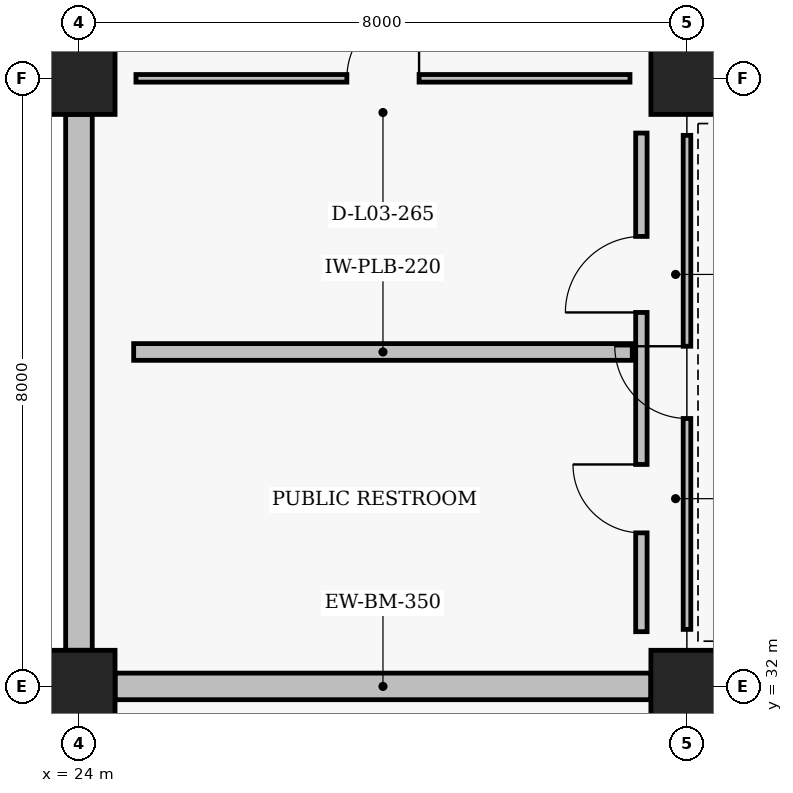
"""IFC4 building model, lengths in metres.
Left out: names, types, materials, properties, quantities, classifications, styles, units other than length and angle.
Written with IfcOpenShell. Run it as: python <this file> out.ifc"""

import sys

from ifc_helpers import new_model, si_unit, direction, frame, frame_2d, origin, origin_2d, place, context, subcontext, project, spatial, rectangle, extrude, element, fill, save


model = new_model("IFC4")
c1 = context("Model", 3, precision=1e-05, world=origin(), true_north=direction((0.0, 1.0)))
c2 = subcontext(c1, "Body", "Model", "MODEL_VIEW")
j1 = project(units=[si_unit("LENGTHUNIT", "METRE"), si_unit("PLANEANGLEUNIT", "RADIAN")], contexts=[c1])
p1 = place(None, origin())
s1 = spatial("IfcSite", under=j1, at=p1, CompositionType="ELEMENT")
p2 = place(p1, origin())
s2 = spatial("IfcBuilding", under=s1, at=p2, CompositionType="ELEMENT")
p3 = place(p2, frame((0.0, 0.0, 9.6)))
s3 = spatial("IfcBuildingStorey", under=s2, at=p3, CompositionType="ELEMENT", Elevation=9.6)
for number, where, z_axis, x_axis in (
    (1, (24.0, 32.0, 0.0), (0.0, 0.0, 1.0), (1.0, 0.0, 0.0)),
    (2, (24.0, 40.0, 0.0), (0.0, 0.0, 1.0), (1.0, 0.0, 0.0)),
    (3, (32.0, 32.0, 0.0), (0.0, 0.0, 1.0), (1.0, 0.0, 0.0)),
    (4, (32.0, 40.0, 0.0), (0.0, 0.0, 1.0), (1.0, 0.0, 0.0)),
):
    element("IfcColumn", number, at=place(p3, frame(where, z_axis=z_axis, x_axis=x_axis)), inside=s3, PredefinedType="COLUMN", context=c2, shape_type="SweptSolid", body=[
        extrude(rectangle(XDim=0.95, YDim=0.95, at=origin_2d()), origin(), (0.0, 0.0, 1.0), 4.8),
    ])
p4 = place(p3, frame((24.475, 32.0, 0.0), z_axis=(0.0, 0.0, 1.0), x_axis=(1.0, 0.0, 0.0)))
e5 = element("IfcWall", 5, at=p4, inside=s3, PredefinedType="SOLIDWALL", context=c2, shape_type="SweptSolid", body=[
    extrude(rectangle(XDim=7.05, YDim=0.35, at=frame_2d((3.525, 0.0))), origin(), (0.0, 0.0, 1.0), 3.93),
])
p5 = place(p3, frame((24.0, 32.475, 0.0), z_axis=(0.0, 0.0, 1.0), x_axis=(0.0, 1.0, 0.0)))
e6 = element("IfcWall", 6, at=p5, inside=s3, PredefinedType="SOLIDWALL", context=c2, shape_type="SweptSolid", body=[
    extrude(rectangle(XDim=7.05, YDim=0.35, at=frame_2d((3.525, 0.0))), origin(), (0.0, 0.0, 1.0), 3.68),
])
p6 = place(p3, frame((24.72, 36.4, 0.0), z_axis=(0.0, 0.0, 1.0), x_axis=(1.0, 0.0, 0.0)))
e7 = element("IfcWall", 7, at=p6, inside=s3, PredefinedType="PLUMBINGWALL", context=c2, shape_type="SweptSolid", body=[
    extrude(rectangle(XDim=6.56, YDim=0.22, at=frame_2d((3.28, 0.0))), origin(), (0.0, 0.0, 1.0), 4.18),
])
p7 = place(p3, frame((31.4, 32.72, 0.0), z_axis=(0.0, 0.0, 1.0), x_axis=(0.0, 1.0, 0.0)))
e8 = element("IfcWall", 8, at=p7, inside=s3, PredefinedType="PARTITIONING", context=c2, shape_type="SweptSolid", body=[
    extrude(rectangle(XDim=6.56, YDim=0.15, at=frame_2d((3.28, 0.0))), origin(), (0.0, 0.0, 1.0), 4.18),
])
p8 = place(p7, frame((1.3, 0.0, 0.0)))
e9 = element("IfcOpeningElement", 9, at=p8, cuts=e8, PredefinedType="OPENING", context=c2, shape_type="SweptSolid", body=[
    extrude(rectangle(XDim=0.9, YDim=2.1, at=frame_2d((0.45, 1.05))), frame((0.0, 0.085, 0.0), z_axis=(0.0, -1.0, 0.0), x_axis=(1.0, 0.0, 0.0)), (0.0, 0.0, 1.0), 0.17),
])
p9 = place(p7, frame((4.2, 0.0, 0.0)))
e10 = element("IfcOpeningElement", 10, at=p9, cuts=e8, PredefinedType="OPENING", context=c2, shape_type="SweptSolid", body=[
    extrude(rectangle(XDim=1.0, YDim=2.15, at=frame_2d((0.5, 1.075))), frame((0.0, 0.085, 0.0), z_axis=(0.0, -1.0, 0.0), x_axis=(1.0, 0.0, 0.0)), (0.0, 0.0, 1.0), 0.17),
])
p10 = place(p3, frame((24.75, 40.0, 0.0), z_axis=(0.0, 0.0, 1.0), x_axis=(1.0, 0.0, 0.0)))
e11 = element("IfcWall", 11, at=p10, inside=s3, PredefinedType="PARTITIONING", context=c2, shape_type="SweptSolid", body=[
    extrude(rectangle(XDim=6.5, YDim=0.1, at=frame_2d((3.25, 0.0))), origin(), (0.0, 0.0, 1.0), 3.68),
])
p11 = place(p10, frame((2.775, 0.0, 0.0)))
e12 = element("IfcOpeningElement", 12, at=p11, cuts=e11, PredefinedType="OPENING", context=c2, shape_type="SweptSolid", body=[
    extrude(rectangle(XDim=0.95, YDim=2.1, at=frame_2d((0.475, 1.05))), frame((0.0, 0.06, 0.0), z_axis=(0.0, -1.0, 0.0), x_axis=(1.0, 0.0, 0.0)), (0.0, 0.0, 1.0), 0.12),
])
p12 = place(p3, frame((32.0, 32.75, 0.0), z_axis=(0.0, 0.0, 1.0), x_axis=(0.0, 1.0, 0.0)))
e13 = element("IfcWall", 13, at=p12, inside=s3, PredefinedType="PARTITIONING", context=c2, shape_type="SweptSolid", body=[
    extrude(rectangle(XDim=6.5, YDim=0.1, at=frame_2d((3.25, 0.0))), origin(), (0.0, 0.0, 1.0), 3.93),
])
p13 = place(p12, frame((2.775, 0.0, 0.0)))
e14 = element("IfcOpeningElement", 14, at=p13, cuts=e13, PredefinedType="OPENING", context=c2, shape_type="SweptSolid", body=[
    extrude(rectangle(XDim=0.95, YDim=2.1, at=frame_2d((0.475, 1.05))), frame((0.0, 0.06, 0.0), z_axis=(0.0, -1.0, 0.0), x_axis=(1.0, 0.0, 0.0)), (0.0, 0.0, 1.0), 0.12),
])
p14 = place(p8, origin())
e15 = element("IfcDoor", 15, at=p14, inside=s3, OperationType="SINGLE_SWING_RIGHT", PredefinedType="DOOR", context=c2, shape_type="SweptSolid", body=[
    extrude(rectangle(XDim=0.9, YDim=2.1, at=frame_2d((0.45, 1.05))), frame((0.0, 0.025, 0.0), z_axis=(0.0, -1.0, 0.0), x_axis=(1.0, 0.0, 0.0)), (0.0, 0.0, 1.0), 0.05),
])
fill(e9, e15)
p15 = place(p9, origin())
e16 = element("IfcDoor", 16, at=p15, inside=s3, OperationType="SINGLE_SWING_LEFT", PredefinedType="DOOR", context=c2, shape_type="SweptSolid", body=[
    extrude(rectangle(XDim=1.0, YDim=2.15, at=frame_2d((0.5, 1.075))), frame((0.0, 0.025, 0.0), z_axis=(0.0, -1.0, 0.0), x_axis=(1.0, 0.0, 0.0)), (0.0, 0.0, 1.0), 0.05),
])
fill(e10, e16)
p16 = place(p11, origin())
e17 = element("IfcDoor", 17, at=p16, inside=s3, OperationType="SINGLE_SWING_RIGHT", PredefinedType="DOOR", context=c2, shape_type="SweptSolid", body=[
    extrude(rectangle(XDim=0.95, YDim=2.1, at=frame_2d((0.475, 1.05))), frame((0.0, 0.025, 0.0), z_axis=(0.0, -1.0, 0.0), x_axis=(1.0, 0.0, 0.0)), (0.0, 0.0, 1.0), 0.05),
])
fill(e12, e17)
p17 = place(p13, origin())
e18 = element("IfcDoor", 18, at=p17, inside=s3, OperationType="SINGLE_SWING_RIGHT", PredefinedType="DOOR", context=c2, shape_type="SweptSolid", body=[
    extrude(rectangle(XDim=0.95, YDim=2.1, at=frame_2d((0.475, 1.05))), frame((0.0, 0.025, 0.0), z_axis=(0.0, -1.0, 0.0), x_axis=(1.0, 0.0, 0.0)), (0.0, 0.0, 1.0), 0.05),
])
fill(e14, e18)
save(model, sys.argv[1])
